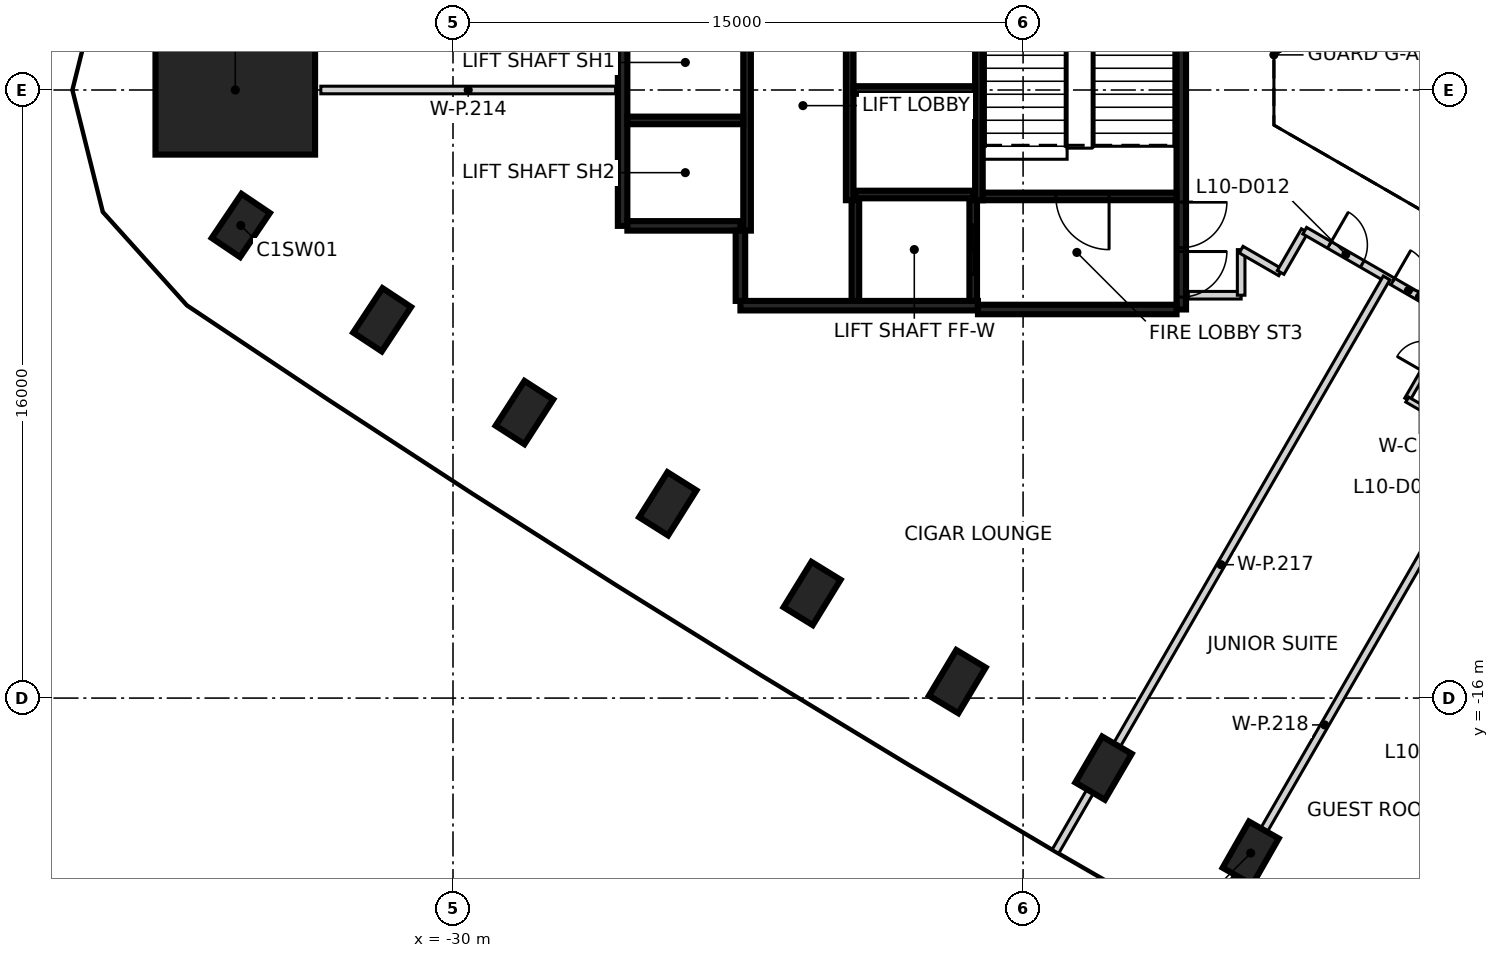
"""IFC4 building model, lengths in metres.
Left out: names, types, materials, properties, quantities, classifications, styles, units other than length and angle.
Written with IfcOpenShell. Run it as: python <this file> out.ifc"""

import sys

from ifc_helpers import new_model, si_unit, direction, frame, frame_2d, origin, origin_2d, place, context, subcontext, project, spatial, rectangle, extrude, element, fill, save


model = new_model("IFC4")
c1 = context("Model", 3, precision=1e-05, world=origin(), true_north=direction((0.0, 1.0)))
c2 = subcontext(c1, "Body", "Model", "MODEL_VIEW")
j1 = project(units=[si_unit("LENGTHUNIT", "METRE"), si_unit("PLANEANGLEUNIT", "RADIAN")], contexts=[c1])
p1 = place(None, origin())
s1 = spatial("IfcSite", under=j1, at=p1, CompositionType="ELEMENT")
p2 = place(p1, origin())
s2 = spatial("IfcBuilding", under=s1, at=p2, CompositionType="ELEMENT")
p3 = place(p2, frame((0.0, 0.0, 49.4)))
s3 = spatial("IfcBuildingStorey", under=s2, at=p3, CompositionType="ELEMENT", Elevation=49.4)
for number, where, z_axis, x_axis in (
    (1, (-35.583, -3.565, -0.475), (0.0, 0.0, 1.0), (0.559, 0.829, 0.0)),
    (2, (-31.865, -6.046, -0.475), (0.0, 0.0, 1.0), (0.551, 0.835, 0.0)),
    (3, (-28.12, -8.488, -0.475), (0.0, 0.0, 1.0), (0.541, 0.841, 0.0)),
    (4, (-24.349, -10.888, -0.475), (0.0, 0.0, 1.0), (0.532, 0.846, 0.0)),
    (5, (-20.552, -13.248, -0.475), (0.0, 0.0, 1.0), (0.523, 0.852, 0.0)),
    (6, (-16.73, -15.566, -0.475), (0.0, 0.0, 1.0), (0.514, 0.858, 0.0)),
    (7, (-12.883, -17.844, -0.475), (0.0, 0.0, 1.0), (0.505, 0.863, 0.0)),
    (8, (-9.011, -20.079, -0.475), (0.0, 0.0, 1.0), (0.495, 0.869, 0.0)),
):
    element("IfcColumn", number, at=place(p3, frame(where, z_axis=z_axis, x_axis=x_axis)), inside=s3, PredefinedType="COLUMN", context=c2, shape_type="SweptSolid", body=[
        extrude(rectangle(XDim=1.4, YDim=0.9, at=origin_2d()), origin(), (0.0, 0.0, 1.0), 3.6),
    ])
p4 = place(p3, frame((-35.729, 0.0, -0.475), z_axis=(0.0, 0.0, 1.0), x_axis=(1.0, 0.0, 0.0)))
e9 = element("IfcColumn", 9, at=p4, inside=s3, PredefinedType="COLUMN", context=c2, shape_type="SweptSolid", body=[
    extrude(rectangle(XDim=4.2, YDim=3.4, at=origin_2d()), origin(), (0.0, 0.0, 1.0), 3.6),
])
p5 = place(p3, frame((-10.837, 5.775, 0.0), z_axis=(0.0, 0.0, 1.0), x_axis=(0.0, -1.0, 0.0)))
e10 = element("IfcWall", 10, at=p5, inside=s3, PredefinedType="SHEAR", context=c2, shape_type="SweptSolid", body=[
    extrude(rectangle(XDim=11.55, YDim=0.25, at=frame_2d((5.775, 0.0))), origin(), (0.0, 0.0, 1.0), 3.125),
])
p6 = place(p5, frame((10.025, 0.0, 0.0)))
e11 = element("IfcOpeningElement", 11, at=p6, cuts=e10, PredefinedType="OPENING", context=c2, shape_type="SweptSolid", body=[
    extrude(rectangle(XDim=1.2, YDim=2.1, at=frame_2d((0.6, 1.05))), frame((0.0, 0.135, 0.0), z_axis=(0.0, -1.0, 0.0), x_axis=(1.0, 0.0, 0.0)), (0.0, 0.0, 1.0), 0.27),
])
p7 = place(p5, frame((8.725, 0.0, 0.0)))
e12 = element("IfcOpeningElement", 12, at=p7, cuts=e10, PredefinedType="OPENING", context=c2, shape_type="SweptSolid", body=[
    extrude(rectangle(XDim=1.2, YDim=2.1, at=frame_2d((0.6, 1.05))), frame((0.0, 0.135, 0.0), z_axis=(0.0, -1.0, 0.0), x_axis=(1.0, 0.0, 0.0)), (0.0, 0.0, 1.0), 0.27),
])
p8 = place(p3, frame((-16.187, -5.675, 0.0), z_axis=(0.0, 0.0, 1.0), x_axis=(-1.0, 0.0, 0.0)))
e13 = element("IfcWall", 13, at=p8, inside=s3, PredefinedType="SHEAR", context=c2, shape_type="SweptSolid", body=[
    extrude(rectangle(XDim=6.25, YDim=0.25, at=frame_2d((3.125, 0.0))), origin(), (0.0, 0.0, 1.0), 3.125),
])
p9 = place(p3, frame((-25.537, -3.575, 0.0), z_axis=(0.0, 0.0, 1.0), x_axis=(0.0, 1.0, 0.0)))
e14 = element("IfcWall", 14, at=p9, inside=s3, PredefinedType="SHEAR", context=c2, shape_type="SweptSolid", body=[
    extrude(rectangle(XDim=5.85, YDim=0.25, at=frame_2d((2.925, 0.0))), origin(), (0.0, 0.0, 1.0), 3.125),
])
p10 = place(p3, frame((-10.963, -5.775, 0.0), z_axis=(0.0, 0.0, 1.0), x_axis=(-1.0, 0.0, 0.0)))
e15 = element("IfcWall", 15, at=p10, inside=s3, PredefinedType="SHEAR", context=c2, shape_type="SweptSolid", body=[
    extrude(rectangle(XDim=5.225, YDim=0.25, at=frame_2d((2.612, 0.0))), origin(), (0.0, 0.0, 1.0), 3.125),
])
p11 = place(p3, frame((-22.437, -3.575, 0.0), z_axis=(0.0, 0.0, 1.0), x_axis=(-1.0, 0.0, 0.0)))
e16 = element("IfcWall", 16, at=p11, inside=s3, PredefinedType="SHEAR", context=c2, shape_type="SweptSolid", body=[
    extrude(rectangle(XDim=2.975, YDim=0.25, at=frame_2d((1.487, 0.0))), origin(), (0.0, 0.0, 1.0), 3.125),
])
p12 = place(p3, frame((-22.437, -5.55, 0.0), z_axis=(0.0, 0.0, 1.0), x_axis=(0.0, 1.0, 0.0)))
e17 = element("IfcWall", 17, at=p12, inside=s3, PredefinedType="SHEAR", context=c2, shape_type="SweptSolid", body=[
    extrude(rectangle(XDim=1.849, YDim=0.25, at=frame_2d((0.925, 0.0))), origin(), (0.0, 0.0, 1.0), 3.125),
])
p13 = place(p3, frame((-16.162, 2.951, 0.0), z_axis=(0.0, 0.0, 1.0), x_axis=(0.0, -1.0, 0.0)))
e18 = element("IfcWall", 18, at=p13, inside=s3, PredefinedType="SHEAR", context=c2, shape_type="SweptSolid", body=[
    extrude(rectangle(XDim=5.851, YDim=0.2, at=frame_2d((2.925, 0.0))), origin(), (0.0, 0.0, 1.0), 3.125),
])
for number, where, z_axis, x_axis in (
    (19, (-19.562, -2.9, 0.0), (0.0, 0.0, 1.0), (0.0, 1.0, 0.0)),
    (20, (-22.262, 2.4, 0.0), (0.0, 0.0, 1.0), (0.0, -1.0, 0.0)),
):
    element("IfcWall", number, at=place(p3, frame(where, z_axis=z_axis, x_axis=x_axis)), inside=s3, PredefinedType="SHEAR", context=c2, shape_type="SweptSolid", body=[
        extrude(rectangle(XDim=6.1, YDim=0.2, at=frame_2d((3.05, 0.0))), origin(), (0.0, 0.0, 1.0), 3.125),
    ])
p14 = place(p3, frame((-10.963, -2.8, 0.0), z_axis=(0.0, 0.0, 1.0), x_axis=(-1.0, 0.0, 0.0)))
e21 = element("IfcWall", 21, at=p14, inside=s3, PredefinedType="SHEAR", context=c2, shape_type="SweptSolid", body=[
    extrude(rectangle(XDim=5.098, YDim=0.2, at=frame_2d((2.549, 0.0))), origin(), (0.0, 0.0, 1.0), 3.125),
])
p15 = place(p14, frame((1.774, 0.0, 0.0)))
e22 = element("IfcOpeningElement", 22, at=p15, cuts=e21, PredefinedType="OPENING", context=c2, shape_type="SweptSolid", body=[
    extrude(rectangle(XDim=1.4, YDim=2.1, at=frame_2d((0.7, 1.05))), frame((0.0, 0.11, 0.0), z_axis=(0.0, -1.0, 0.0), x_axis=(1.0, 0.0, 0.0)), (0.0, 0.0, 1.0), 0.22),
])
p16 = place(p3, frame((-16.263, 0.0, 0.0), z_axis=(0.0, 0.0, 1.0), x_axis=(-1.0, 0.0, 0.0)))
e23 = element("IfcWall", 23, at=p16, inside=s3, PredefinedType="SHEAR", context=c2, shape_type="SweptSolid", body=[
    extrude(rectangle(XDim=3.198, YDim=0.2, at=frame_2d((1.599, 0.0))), origin(), (0.0, 0.0, 1.0), 3.125),
])
p17 = place(p3, frame((-22.363, -0.8, 0.0), z_axis=(0.0, 0.0, 1.0), x_axis=(-1.0, 0.0, 0.0)))
e24 = element("IfcWall", 24, at=p17, inside=s3, PredefinedType="SHEAR", context=c2, shape_type="SweptSolid", body=[
    extrude(rectangle(XDim=3.048, YDim=0.2, at=frame_2d((1.524, 0.0))), origin(), (0.0, 0.0, 1.0), 3.125),
])
p18 = place(p3, frame((-19.412, -2.75, 0.0), z_axis=(0.0, 0.0, 1.0), x_axis=(1.0, 0.0, 0.0)))
e25 = element("IfcWall", 25, at=p18, inside=s3, PredefinedType="SHEAR", context=c2, shape_type="SweptSolid", body=[
    extrude(rectangle(XDim=3.1, YDim=0.2, at=frame_2d((1.55, 0.0))), origin(), (0.0, 0.0, 1.0), 3.125),
])
p19 = place(p3, frame((-16.312, -2.898, 0.0), z_axis=(0.0, 0.0, 1.0), x_axis=(0.0, -1.0, 0.0)))
e26 = element("IfcWall", 26, at=p19, inside=s3, PredefinedType="SHEAR", context=c2, shape_type="SweptSolid", body=[
    extrude(rectangle(XDim=2.651, YDim=0.2, at=frame_2d((1.325, 0.0))), origin(), (0.0, 0.0, 1.0), 3.125),
])
p20 = place(p19, frame((0.652, 0.0, 0.0)))
e27 = element("IfcOpeningElement", 27, at=p20, cuts=e26, PredefinedType="OPENING", context=c2, shape_type="SweptSolid", body=[
    extrude(rectangle(XDim=1.3, YDim=2.1, at=frame_2d((0.65, 1.05))), frame((0.0, 0.11, 0.0), z_axis=(0.0, -1.0, 0.0), x_axis=(1.0, 0.0, 0.0)), (0.0, 0.0, 1.0), 0.22),
])
p21 = place(p3, frame((-19.412, -5.549, 0.0), z_axis=(0.0, 0.0, 1.0), x_axis=(0.0, 1.0, 0.0)))
e28 = element("IfcWall", 28, at=p21, inside=s3, PredefinedType="SHEAR", context=c2, shape_type="SweptSolid", body=[
    extrude(rectangle(XDim=2.651, YDim=0.2, at=frame_2d((1.325, 0.0))), origin(), (0.0, 0.0, 1.0), 3.125),
])
p22 = place(p3, frame((-10.652, -5.4, 0.0), z_axis=(0.0, 0.0, 1.0), x_axis=(1.0, 0.0, 0.0)))
e29 = element("IfcWall", 29, at=p22, inside=s3, PredefinedType="PARTITIONING", context=c2, shape_type="SweptSolid", body=[
    extrude(rectangle(XDim=1.39, YDim=0.2, at=frame_2d((0.695, 0.0))), origin(), (0.0, 0.0, 1.0), 3.125),
])
for number, where, z_axis, x_axis in (
    (30, (-9.262, -5.4, 0.0), (0.0, 0.0, 1.0), (0.0, 1.0, 0.0)),
    (31, (-9.262, -4.2, 0.0), (0.0, 0.0, 1.0), (0.866, -0.5, 0.0)),
):
    element("IfcWall", number, at=place(p3, frame(where, z_axis=z_axis, x_axis=x_axis)), inside=s3, PredefinedType="PARTITIONING", context=c2, shape_type="SweptSolid", body=[
        extrude(rectangle(XDim=1.2, YDim=0.2, at=frame_2d((0.6, 0.0))), origin(), (0.0, 0.0, 1.0), 3.125),
    ])
p23 = place(p3, frame((-8.223, -4.8, 0.0), z_axis=(0.0, 0.0, 1.0), x_axis=(0.499866914522, 0.866102227088, 0.0)))
e32 = element("IfcWall", 32, at=p23, inside=s3, PredefinedType="PARTITIONING", context=c2, shape_type="SweptSolid", body=[
    extrude(rectangle(XDim=1.268, YDim=0.2, at=frame_2d((0.634, 0.0))), origin(), (0.0, 0.0, 1.0), 3.125),
])
p24 = place(p3, frame((-7.589, -3.702, 0.0), z_axis=(0.0, 0.0, 1.0), x_axis=(0.865994210678, -0.500054024153, 0.0)))
e33 = element("IfcWall", 33, at=p24, inside=s3, PredefinedType="PARTITIONING", context=c2, shape_type="SweptSolid", body=[
    extrude(rectangle(XDim=6.969, YDim=0.2, at=frame_2d((3.484, 0.0))), origin(), (0.0, 0.0, 1.0), 3.125),
])
p25 = place(p24, frame((0.749, 0.0, 0.0)))
e34 = element("IfcOpeningElement", 34, at=p25, cuts=e33, PredefinedType="OPENING", context=c2, shape_type="SweptSolid", body=[
    extrude(rectangle(XDim=1.0, YDim=2.1, at=frame_2d((0.5, 1.05))), frame((0.0, 0.11, 0.0), z_axis=(0.0, -1.0, 0.0), x_axis=(1.0, 0.0, 0.0)), (0.0, 0.0, 1.0), 0.22),
])
p26 = place(p24, frame((2.674, 0.0, 0.0)))
e35 = element("IfcOpeningElement", 35, at=p26, cuts=e33, PredefinedType="OPENING", context=c2, shape_type="SweptSolid", body=[
    extrude(rectangle(XDim=0.95, YDim=2.1, at=frame_2d((0.475, 1.05))), frame((0.0, 0.11, 0.0), z_axis=(0.0, -1.0, 0.0), x_axis=(1.0, 0.0, 0.0)), (0.0, 0.0, 1.0), 0.22),
])
p27 = place(p3, frame((-33.478, 0.0, 0.0), z_axis=(0.0, 0.0, 1.0), x_axis=(1.0, 0.0, 0.0)))
e36 = element("IfcWall", 36, at=p27, inside=s3, PredefinedType="PARTITIONING", context=c2, shape_type="SweptSolid", body=[
    extrude(rectangle(XDim=7.756, YDim=0.2, at=frame_2d((3.878, 0.0))), origin(), (0.0, 0.0, 1.0), 3.125),
])
p28 = place(p3, frame((-14.148, -20.035, 0.0), z_axis=(0.0, 0.0, 1.0), x_axis=(0.499978771293, 0.866037659837, 0.0)))
e37 = element("IfcWall", 37, at=p28, inside=s3, PredefinedType="PARTITIONING", context=c2, shape_type="SweptSolid", body=[
    extrude(rectangle(XDim=17.425, YDim=0.2, at=frame_2d((8.712, 0.0))), origin(), (0.0, 0.0, 1.0), 3.125),
])
p29 = place(p3, frame((-10.276, -22.271, 0.0), z_axis=(0.0, 0.0, 1.0), x_axis=(0.499984478165, 0.866034365135, 0.0)))
e38 = element("IfcWall", 38, at=p29, inside=s3, PredefinedType="PARTITIONING", context=c2, shape_type="SweptSolid", body=[
    extrude(rectangle(XDim=12.851, YDim=0.2, at=frame_2d((6.426, 0.0))), origin(), (0.0, 0.0, 1.0), 3.125),
])
p30 = place(p3, frame((-6.381, -24.464, 0.0), z_axis=(0.0, 0.0, 1.0), x_axis=(0.500007577232, 0.866021029023, 0.0)))
e39 = element("IfcWall", 39, at=p30, inside=s3, PredefinedType="PARTITIONING", context=c2, shape_type="SweptSolid", body=[
    extrude(rectangle(XDim=9.883, YDim=0.2, at=frame_2d((4.941, 0.0))), origin(), (0.0, 0.0, 1.0), 3.125),
])
p31 = place(p3, frame((-4.892, -8.145, 0.0), z_axis=(0.0, 0.0, 1.0), x_axis=(0.499711178953, 0.866192090491, 0.0)))
e40 = element("IfcWall", 40, at=p31, inside=s3, PredefinedType="PARTITIONING", context=c2, shape_type="SweptSolid", body=[
    extrude(rectangle(XDim=2.5, YDim=0.15, at=frame_2d((1.25, 0.0))), origin(), (0.0, 0.0, 1.0), 3.125),
])
p32 = place(p31, frame((0.85, 0.0, 0.0)))
e41 = element("IfcOpeningElement", 41, at=p32, cuts=e40, PredefinedType="OPENING", context=c2, shape_type="SweptSolid", body=[
    extrude(rectangle(XDim=0.8, YDim=2.1, at=frame_2d((0.4, 1.05))), frame((0.0, 0.085, 0.0), z_axis=(0.0, -1.0, 0.0), x_axis=(1.0, 0.0, 0.0)), (0.0, 0.0, 1.0), 0.17),
])
p33 = place(p3, frame((-4.892, -8.145, 0.0), z_axis=(0.0, 0.0, 1.0), x_axis=(0.865999212041, -0.500045362686, 0.0)))
e42 = element("IfcWall", 42, at=p33, inside=s3, PredefinedType="PARTITIONING", context=c2, shape_type="SweptSolid", body=[
    extrude(rectangle(XDim=2.4, YDim=0.15, at=frame_2d((1.2, 0.0))), origin(), (0.0, 0.0, 1.0), 3.125),
])
p34 = place(p20, origin())
e43 = element("IfcDoor", 43, at=p34, inside=s3, OperationType="SLIDING_TO_RIGHT", PredefinedType="DOOR", context=c2, shape_type="SweptSolid", body=[
    extrude(rectangle(XDim=1.3, YDim=2.1, at=frame_2d((0.65, 1.05))), frame((0.0, 0.025, 0.0), z_axis=(0.0, -1.0, 0.0), x_axis=(1.0, 0.0, 0.0)), (0.0, 0.0, 1.0), 0.05),
])
fill(e27, e43)
p35 = place(p6, origin())
e44 = element("IfcDoor", 44, at=p35, inside=s3, OperationType="SINGLE_SWING_LEFT", PredefinedType="DOOR", context=c2, shape_type="SweptSolid", body=[
    extrude(rectangle(XDim=1.2, YDim=2.1, at=frame_2d((0.6, 1.05))), frame((0.0, 0.025, 0.0), z_axis=(0.0, -1.0, 0.0), x_axis=(1.0, 0.0, 0.0)), (0.0, 0.0, 1.0), 0.05),
])
fill(e11, e44)
p36 = place(p7, origin())
e45 = element("IfcDoor", 45, at=p36, inside=s3, OperationType="SINGLE_SWING_RIGHT", PredefinedType="DOOR", context=c2, shape_type="SweptSolid", body=[
    extrude(rectangle(XDim=1.2, YDim=2.1, at=frame_2d((0.6, 1.05))), frame((0.0, 0.025, 0.0), z_axis=(0.0, -1.0, 0.0), x_axis=(1.0, 0.0, 0.0)), (0.0, 0.0, 1.0), 0.05),
])
fill(e12, e45)
p37 = place(p15, origin())
e46 = element("IfcDoor", 46, at=p37, inside=s3, OperationType="SINGLE_SWING_RIGHT", PredefinedType="DOOR", context=c2, shape_type="SweptSolid", body=[
    extrude(rectangle(XDim=1.4, YDim=2.1, at=frame_2d((0.7, 1.05))), frame((0.0, 0.025, 0.0), z_axis=(0.0, -1.0, 0.0), x_axis=(1.0, 0.0, 0.0)), (0.0, 0.0, 1.0), 0.05),
])
fill(e22, e46)
p38 = place(p25, frame((1.0, 0.0, 0.0), z_axis=(0.0, 0.0, 1.0), x_axis=(-1.0, 0.0, 0.0)))
e47 = element("IfcDoor", 47, at=p38, inside=s3, OperationType="SINGLE_SWING_LEFT", PredefinedType="DOOR", context=c2, shape_type="SweptSolid", body=[
    extrude(rectangle(XDim=1.0, YDim=2.1, at=frame_2d((0.5, 1.05))), frame((0.0, 0.025, 0.0), z_axis=(0.0, -1.0, 0.0), x_axis=(1.0, 0.0, 0.0)), (0.0, 0.0, 1.0), 0.05),
])
fill(e34, e47)
p39 = place(p26, frame((0.95, 0.0, 0.0), z_axis=(0.0, 0.0, 1.0), x_axis=(-1.0, 0.0, 0.0)))
e48 = element("IfcDoor", 48, at=p39, inside=s3, OperationType="SINGLE_SWING_LEFT", PredefinedType="DOOR", context=c2, shape_type="SweptSolid", body=[
    extrude(rectangle(XDim=0.95, YDim=2.1, at=frame_2d((0.475, 1.05))), frame((0.0, 0.025, 0.0), z_axis=(0.0, -1.0, 0.0), x_axis=(1.0, 0.0, 0.0)), (0.0, 0.0, 1.0), 0.05),
])
fill(e35, e48)
save(model, sys.argv[1])
